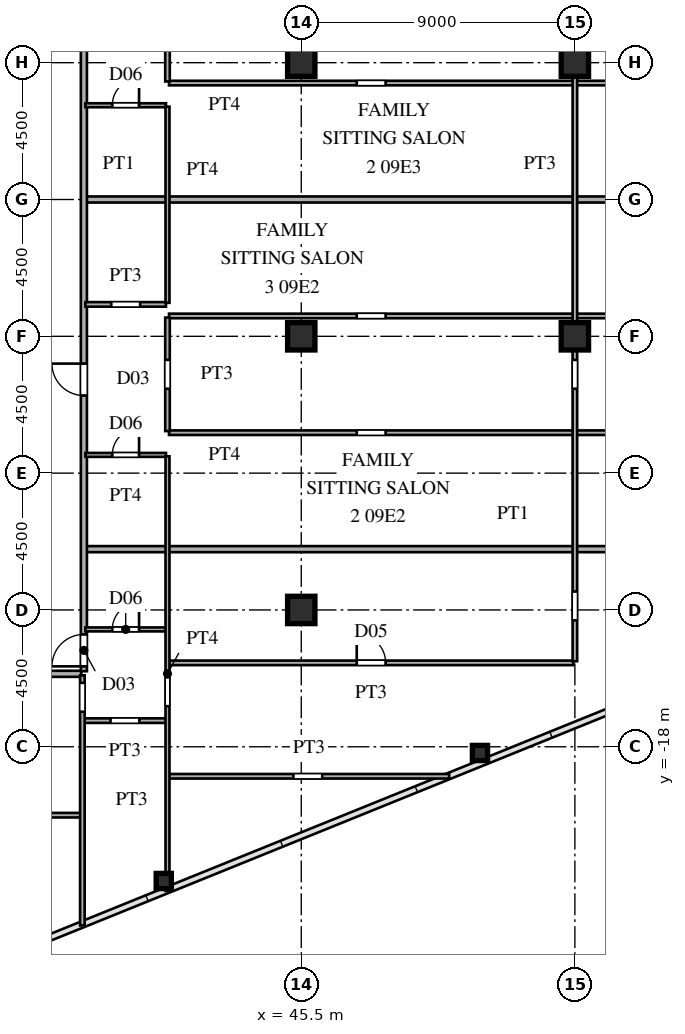
"""IFC4 building model, lengths in metres.
Left out: names, types, materials, properties, quantities, classifications, styles, units other than length and angle.
Written with IfcOpenShell. Run it as: python <this file> out.ifc"""

import sys

from ifc_helpers import new_model, si_unit, direction, frame, frame_2d, origin, origin_2d, place, context, subcontext, project, spatial, rectangle, hollow_rectangle, i_section, extrude, source, transform, mapped, element, fill, save


model = new_model("IFC4")
c1 = context("Model", 3, precision=1e-05, world=origin(), true_north=direction((0.0, 1.0)))
c2 = subcontext(c1, "Body", "Model", "MODEL_VIEW")
j1 = project(units=[si_unit("LENGTHUNIT", "METRE"), si_unit("PLANEANGLEUNIT", "RADIAN")], contexts=[c1])
p1 = place(None, origin())
s1 = spatial("IfcSite", under=j1, at=p1, CompositionType="ELEMENT")
p2 = place(p1, origin())
s2 = spatial("IfcBuilding", under=s1, at=p2, CompositionType="ELEMENT")
p3 = place(p2, frame((0.0, 0.0, 36.9)))
s3 = spatial("IfcBuildingStorey", under=s2, at=p3, CompositionType="ELEMENT", Elevation=36.9)
m1 = source(origin(), c2, "Body", "SweptSolid", [
    extrude(i_section(OverallWidth=0.9, OverallDepth=0.9, WebThickness=0.036, FlangeThickness=0.055, at=origin_2d()), origin(), (0.0, 0.0, 1.0), 3.6),
])
for number, where, z_axis, x_axis in (
    (1, (45.5, -13.5, 0.0), (0.0, 0.0, 1.0), (1.0, 0.0, 0.0)),
    (2, (45.5, -4.5, 0.0), (0.0, 0.0, 1.0), (1.0, 0.0, 0.0)),
    (3, (45.5, 4.5, 0.0), (0.0, 0.0, 1.0), (1.0, 0.0, 0.0)),
    (4, (54.5, -4.5, 0.0), (0.0, 0.0, 1.0), (1.0, 0.0, 0.0)),
    (5, (54.5, 4.5, 0.0), (0.0, 0.0, 1.0), (1.0, 0.0, 0.0)),
):
    element("IfcColumn", number, at=place(p3, frame(where, z_axis=z_axis, x_axis=x_axis)), inside=s3, PredefinedType="COLUMN", context=c2, shape_type="MappedRepresentation", body=[
        mapped(m1, transform((0.0, 0.0, 0.0), scale=1.0)),
    ])
m2 = source(origin(), c2, "Body", "SweptSolid", [
    extrude(hollow_rectangle(XDim=0.5, YDim=0.5, WallThickness=0.02, at=origin_2d()), origin(), (0.0, 0.0, 1.0), 3.6),
])
for number, where, z_axis, x_axis in (
    (6, (40.977, -22.414, 0.0), (0.0, 0.0, 1.0), (1.0, 0.0, 0.0)),
    (7, (51.378, -18.204, 0.0), (0.0, 0.0, 1.0), (1.0, 0.0, 0.0)),
):
    element("IfcColumn", number, at=place(p3, frame(where, z_axis=z_axis, x_axis=x_axis)), inside=s3, PredefinedType="COLUMN", context=c2, shape_type="MappedRepresentation", body=[
        mapped(m2, transform((0.0, 0.0, 0.0), scale=1.0)),
    ])
p4 = place(p3, frame((27.465, -20.25, 0.0), z_axis=(0.0, 0.0, 1.0), x_axis=(1.0, 0.0, 0.0)))
e8 = element("IfcWall", 8, at=p4, inside=s3, PredefinedType="PARTITIONING", context=c2, shape_type="SweptSolid", body=[
    extrude(rectangle(XDim=10.785, YDim=0.15, at=frame_2d((5.393, 0.0))), origin(), (0.0, 0.0, 1.0), 3.38),
])
p5 = place(p4, frame((4.96, 0.0, 0.0)))
e9 = element("IfcOpeningElement", 9, at=p5, cuts=e8, PredefinedType="OPENING", context=c2, shape_type="SweptSolid", body=[
    extrude(rectangle(XDim=0.95, YDim=2.15, at=frame_2d((0.475, 1.075))), frame((0.0, 0.085, 0.0), z_axis=(0.0, -1.0, 0.0), x_axis=(1.0, 0.0, 0.0)), (0.0, 0.0, 1.0), 0.17),
])
p6 = place(p3, frame((41.15, -18.97, 0.0), z_axis=(0.0, 0.0, 1.0), x_axis=(1.0, 0.0, 0.0)))
e10 = element("IfcWall", 10, at=p6, inside=s3, PredefinedType="PARTITIONING", context=c2, shape_type="SweptSolid", body=[
    extrude(rectangle(XDim=9.216, YDim=0.15, at=frame_2d((4.608, 0.0))), origin(), (0.0, 0.0, 1.0), 3.38),
])
p7 = place(p6, frame((4.091, 0.0, 0.0)))
e11 = element("IfcOpeningElement", 11, at=p7, cuts=e10, PredefinedType="OPENING", context=c2, shape_type="SweptSolid", body=[
    extrude(rectangle(XDim=0.95, YDim=2.15, at=frame_2d((0.475, 1.075))), frame((0.0, 0.085, 0.0), z_axis=(0.0, -1.0, 0.0), x_axis=(1.0, 0.0, 0.0)), (0.0, 0.0, 1.0), 0.17),
])
p8 = place(p3, frame((38.35, -17.14, 0.0), z_axis=(0.0, 0.0, 1.0), x_axis=(1.0, 0.0, 0.0)))
e12 = element("IfcWall", 12, at=p8, inside=s3, PredefinedType="PARTITIONING", context=c2, shape_type="SweptSolid", body=[
    extrude(rectangle(XDim=2.7, YDim=0.15, at=frame_2d((1.35, 0.0))), origin(), (0.0, 0.0, 1.0), 3.38),
])
p9 = place(p8, frame((0.875, 0.0, 0.0)))
e13 = element("IfcOpeningElement", 13, at=p9, cuts=e12, PredefinedType="OPENING", context=c2, shape_type="SweptSolid", body=[
    extrude(rectangle(XDim=0.95, YDim=2.15, at=frame_2d((0.475, 1.075))), frame((0.0, 0.085, 0.0), z_axis=(0.0, -1.0, 0.0), x_axis=(1.0, 0.0, 0.0)), (0.0, 0.0, 1.0), 0.17),
])
p10 = place(p3, frame((36.585, -15.6, 0.0), z_axis=(0.0, 0.0, 1.0), x_axis=(1.0, 0.0, 0.0)))
e14 = element("IfcWall", 14, at=p10, inside=s3, PredefinedType="PARTITIONING", context=c2, shape_type="SweptSolid", body=[
    extrude(rectangle(XDim=1.68, YDim=0.2, at=frame_2d((0.84, 0.0))), origin(), (0.0, 0.0, 1.0), 3.38),
])
p11 = place(p3, frame((41.15, -15.24, 0.0), z_axis=(0.0, 0.0, 1.0), x_axis=(1.0, 0.0, 0.0)))
e15 = element("IfcWall", 15, at=p11, inside=s3, PredefinedType="PARTITIONING", context=c2, shape_type="SweptSolid", body=[
    extrude(rectangle(XDim=13.3, YDim=0.15, at=frame_2d((6.65, 0.0))), origin(), (0.0, 0.0, 1.0), 3.38),
])
p12 = place(p11, frame((6.175, 0.0, 0.0)))
e16 = element("IfcOpeningElement", 16, at=p12, cuts=e15, PredefinedType="OPENING", context=c2, shape_type="SweptSolid", body=[
    extrude(rectangle(XDim=0.95, YDim=2.15, at=frame_2d((0.475, 1.075))), frame((0.0, 0.085, 0.0), z_axis=(0.0, -1.0, 0.0), x_axis=(1.0, 0.0, 0.0)), (0.0, 0.0, 1.0), 0.17),
])
p13 = place(p3, frame((38.4, -14.14, 0.0), z_axis=(0.0, 0.0, 1.0), x_axis=(1.0, 0.0, 0.0)))
e17 = element("IfcWall", 17, at=p13, inside=s3, PredefinedType="PARTITIONING", context=c2, shape_type="SweptSolid", body=[
    extrude(rectangle(XDim=2.65, YDim=0.13, at=frame_2d((1.325, 0.0))), origin(), (0.0, 0.0, 1.0), 3.38),
])
p14 = place(p13, frame((0.885, 0.0, 0.0)))
e18 = element("IfcOpeningElement", 18, at=p14, cuts=e17, PredefinedType="OPENING", context=c2, shape_type="SweptSolid", body=[
    extrude(rectangle(XDim=0.88, YDim=2.1, at=frame_2d((0.44, 1.05))), frame((0.0, 0.075, 0.0), z_axis=(0.0, -1.0, 0.0), x_axis=(1.0, 0.0, 0.0)), (0.0, 0.0, 1.0), 0.15),
])
p15 = place(p3, frame((38.43, -11.5, 0.0), z_axis=(0.0, 0.0, 1.0), x_axis=(1.0, 0.0, 0.0)))
e19 = element("IfcWall", 19, at=p15, inside=s3, PredefinedType="PARTITIONING", context=c2, shape_type="SweptSolid", body=[
    extrude(rectangle(XDim=30.377, YDim=0.2, at=frame_2d((15.188, 0.0))), origin(), (0.0, 0.0, 1.0), 3.38),
])
p16 = place(p3, frame((38.4, -8.4, 0.0), z_axis=(0.0, 0.0, 1.0), x_axis=(1.0, 0.0, 0.0)))
e20 = element("IfcWall", 20, at=p16, inside=s3, PredefinedType="PARTITIONING", context=c2, shape_type="SweptSolid", body=[
    extrude(rectangle(XDim=2.65, YDim=0.13, at=frame_2d((1.325, 0.0))), origin(), (0.0, 0.0, 1.0), 3.38),
])
p17 = place(p16, frame((0.885, 0.0, 0.0)))
e21 = element("IfcOpeningElement", 21, at=p17, cuts=e20, PredefinedType="OPENING", context=c2, shape_type="SweptSolid", body=[
    extrude(rectangle(XDim=0.88, YDim=2.1, at=frame_2d((0.44, 1.05))), frame((0.0, 0.075, 0.0), z_axis=(0.0, -1.0, 0.0), x_axis=(1.0, 0.0, 0.0)), (0.0, 0.0, 1.0), 0.15),
])
p18 = place(p3, frame((41.15, -7.67, 0.0), z_axis=(0.0, 0.0, 1.0), x_axis=(1.0, 0.0, 0.0)))
e22 = element("IfcWall", 22, at=p18, inside=s3, PredefinedType="PARTITIONING", context=c2, shape_type="SweptSolid", body=[
    extrude(rectangle(XDim=31.385, YDim=0.15, at=frame_2d((15.692, 0.0))), origin(), (0.0, 0.0, 1.0), 3.38),
])
p19 = place(p18, frame((6.175, 0.0, 0.0)))
e23 = element("IfcOpeningElement", 23, at=p19, cuts=e22, PredefinedType="OPENING", context=c2, shape_type="SweptSolid", body=[
    extrude(rectangle(XDim=0.95, YDim=2.15, at=frame_2d((0.475, 1.075))), frame((0.0, 0.085, 0.0), z_axis=(0.0, -1.0, 0.0), x_axis=(1.0, 0.0, 0.0)), (0.0, 0.0, 1.0), 0.17),
])
p20 = place(p18, frame((15.725, 0.0, 0.0)))
e24 = element("IfcOpeningElement", 24, at=p20, cuts=e22, PredefinedType="OPENING", context=c2, shape_type="SweptSolid", body=[
    extrude(rectangle(XDim=0.95, YDim=2.15, at=frame_2d((0.475, 1.075))), frame((0.0, 0.085, 0.0), z_axis=(0.0, -1.0, 0.0), x_axis=(1.0, 0.0, 0.0)), (0.0, 0.0, 1.0), 0.17),
])
p21 = place(p3, frame((41.15, -3.83, 0.0), z_axis=(0.0, 0.0, 1.0), x_axis=(1.0, 0.0, 0.0)))
e25 = element("IfcWall", 25, at=p21, inside=s3, PredefinedType="PARTITIONING", context=c2, shape_type="SweptSolid", body=[
    extrude(rectangle(XDim=31.385, YDim=0.15, at=frame_2d((15.692, 0.0))), origin(), (0.0, 0.0, 1.0), 3.38),
])
p22 = place(p21, frame((6.175, 0.0, 0.0)))
e26 = element("IfcOpeningElement", 26, at=p22, cuts=e25, PredefinedType="OPENING", context=c2, shape_type="SweptSolid", body=[
    extrude(rectangle(XDim=0.95, YDim=2.15, at=frame_2d((0.475, 1.075))), frame((0.0, 0.085, 0.0), z_axis=(0.0, -1.0, 0.0), x_axis=(1.0, 0.0, 0.0)), (0.0, 0.0, 1.0), 0.17),
])
p23 = place(p21, frame((15.725, 0.0, 0.0)))
e27 = element("IfcOpeningElement", 27, at=p23, cuts=e25, PredefinedType="OPENING", context=c2, shape_type="SweptSolid", body=[
    extrude(rectangle(XDim=0.95, YDim=2.15, at=frame_2d((0.475, 1.075))), frame((0.0, 0.085, 0.0), z_axis=(0.0, -1.0, 0.0), x_axis=(1.0, 0.0, 0.0)), (0.0, 0.0, 1.0), 0.17),
])
p24 = place(p3, frame((38.4, -3.45, 0.0), z_axis=(0.0, 0.0, 1.0), x_axis=(1.0, 0.0, 0.0)))
e28 = element("IfcWall", 28, at=p24, inside=s3, PredefinedType="PARTITIONING", context=c2, shape_type="SweptSolid", body=[
    extrude(rectangle(XDim=2.65, YDim=0.15, at=frame_2d((1.325, 0.0))), origin(), (0.0, 0.0, 1.0), 3.38),
])
p25 = place(p24, frame((0.85, 0.0, 0.0)))
e29 = element("IfcOpeningElement", 29, at=p25, cuts=e28, PredefinedType="OPENING", context=c2, shape_type="SweptSolid", body=[
    extrude(rectangle(XDim=0.95, YDim=2.15, at=frame_2d((0.475, 1.075))), frame((0.0, 0.085, 0.0), z_axis=(0.0, -1.0, 0.0), x_axis=(1.0, 0.0, 0.0)), (0.0, 0.0, 1.0), 0.17),
])
p26 = place(p3, frame((38.43, 0.0, 0.0), z_axis=(0.0, 0.0, 1.0), x_axis=(1.0, 0.0, 0.0)))
e30 = element("IfcWall", 30, at=p26, inside=s3, PredefinedType="PARTITIONING", context=c2, shape_type="SweptSolid", body=[
    extrude(rectangle(XDim=25.05, YDim=0.2, at=frame_2d((12.525, 0.0))), origin(), (0.0, 0.0, 1.0), 3.38),
])
p27 = place(p3, frame((38.4, 3.1, 0.0), z_axis=(0.0, 0.0, 1.0), x_axis=(1.0, 0.0, 0.0)))
e31 = element("IfcWall", 31, at=p27, inside=s3, PredefinedType="PARTITIONING", context=c2, shape_type="SweptSolid", body=[
    extrude(rectangle(XDim=2.65, YDim=0.13, at=frame_2d((1.325, 0.0))), origin(), (0.0, 0.0, 1.0), 3.38),
])
p28 = place(p27, frame((0.885, 0.0, 0.0)))
e32 = element("IfcOpeningElement", 32, at=p28, cuts=e31, PredefinedType="OPENING", context=c2, shape_type="SweptSolid", body=[
    extrude(rectangle(XDim=0.88, YDim=2.1, at=frame_2d((0.44, 1.05))), frame((0.0, 0.075, 0.0), z_axis=(0.0, -1.0, 0.0), x_axis=(1.0, 0.0, 0.0)), (0.0, 0.0, 1.0), 0.15),
])
p29 = place(p3, frame((41.15, 3.83, 0.0), z_axis=(0.0, 0.0, 1.0), x_axis=(1.0, 0.0, 0.0)))
e33 = element("IfcWall", 33, at=p29, inside=s3, PredefinedType="PARTITIONING", context=c2, shape_type="SweptSolid", body=[
    extrude(rectangle(XDim=31.385, YDim=0.15, at=frame_2d((15.692, 0.0))), origin(), (0.0, 0.0, 1.0), 3.38),
])
p30 = place(p29, frame((6.175, 0.0, 0.0)))
e34 = element("IfcOpeningElement", 34, at=p30, cuts=e33, PredefinedType="OPENING", context=c2, shape_type="SweptSolid", body=[
    extrude(rectangle(XDim=0.95, YDim=2.15, at=frame_2d((0.475, 1.075))), frame((0.0, 0.085, 0.0), z_axis=(0.0, -1.0, 0.0), x_axis=(1.0, 0.0, 0.0)), (0.0, 0.0, 1.0), 0.17),
])
p31 = place(p29, frame((15.725, 0.0, 0.0)))
e35 = element("IfcOpeningElement", 35, at=p31, cuts=e33, PredefinedType="OPENING", context=c2, shape_type="SweptSolid", body=[
    extrude(rectangle(XDim=0.95, YDim=2.15, at=frame_2d((0.475, 1.075))), frame((0.0, 0.085, 0.0), z_axis=(0.0, -1.0, 0.0), x_axis=(1.0, 0.0, 0.0)), (0.0, 0.0, 1.0), 0.17),
])
p32 = place(p3, frame((38.3, -23.878, 0.0), z_axis=(0.0, 0.0, 1.0), x_axis=(0.0, 1.0, 0.0)))
e36 = element("IfcWall", 36, at=p32, inside=s3, PredefinedType="PARTITIONING", context=c2, shape_type="SweptSolid", body=[
    extrude(rectangle(XDim=8.228, YDim=0.15, at=frame_2d((4.114, 0.0))), origin(), (0.0, 0.0, 1.0), 3.38),
])
p33 = place(p32, frame((7.031, 0.0, 0.0)))
e37 = element("IfcOpeningElement", 37, at=p33, cuts=e36, PredefinedType="OPENING", context=c2, shape_type="SweptSolid", body=[
    extrude(rectangle(XDim=0.95, YDim=2.15, at=frame_2d((0.475, 1.075))), frame((0.0, 0.085, 0.0), z_axis=(0.0, -1.0, 0.0), x_axis=(1.0, 0.0, 0.0)), (0.0, 0.0, 1.0), 0.17),
])
p34 = place(p3, frame((38.35, -15.515, 0.0), z_axis=(0.0, 0.0, 1.0), x_axis=(0.0, 1.0, 0.0)))
e38 = element("IfcWall", 38, at=p34, inside=s3, PredefinedType="PARTITIONING", context=c2, shape_type="SweptSolid", body=[
    extrude(rectangle(XDim=31.03, YDim=0.2, at=frame_2d((15.515, 0.0))), origin(), (0.0, 0.0, 1.0), 3.38),
])
p35 = place(p34, frame((0.16, 0.0, 0.0)))
e39 = element("IfcOpeningElement", 39, at=p35, cuts=e38, PredefinedType="OPENING", context=c2, shape_type="SweptSolid", body=[
    extrude(rectangle(XDim=1.05, YDim=2.25, at=frame_2d((0.525, 1.125))), frame((0.0, 0.11, 0.0), z_axis=(0.0, -1.0, 0.0), x_axis=(1.0, 0.0, 0.0)), (0.0, 0.0, 1.0), 0.22),
])
p36 = place(p34, frame((9.067, 0.0, 0.0)))
e40 = element("IfcOpeningElement", 40, at=p36, cuts=e38, PredefinedType="OPENING", context=c2, shape_type="SweptSolid", body=[
    extrude(rectangle(XDim=1.05, YDim=2.25, at=frame_2d((0.525, 1.125))), frame((0.0, 0.11, 0.0), z_axis=(0.0, -1.0, 0.0), x_axis=(1.0, 0.0, 0.0)), (0.0, 0.0, 1.0), 0.22),
])
p37 = place(p34, frame((20.567, 0.0, 0.0)))
e41 = element("IfcOpeningElement", 41, at=p37, cuts=e38, PredefinedType="OPENING", context=c2, shape_type="SweptSolid", body=[
    extrude(rectangle(XDim=1.05, YDim=2.25, at=frame_2d((0.525, 1.125))), frame((0.0, 0.11, 0.0), z_axis=(0.0, -1.0, 0.0), x_axis=(1.0, 0.0, 0.0)), (0.0, 0.0, 1.0), 0.22),
])
p38 = place(p34, frame((29.82, 0.0, 0.0)))
e42 = element("IfcOpeningElement", 42, at=p38, cuts=e38, PredefinedType="OPENING", context=c2, shape_type="SweptSolid", body=[
    extrude(rectangle(XDim=1.05, YDim=2.25, at=frame_2d((0.525, 1.125))), frame((0.0, 0.11, 0.0), z_axis=(0.0, -1.0, 0.0), x_axis=(1.0, 0.0, 0.0)), (0.0, 0.0, 1.0), 0.22),
])
p39 = place(p3, frame((41.1, -22.744, 0.0), z_axis=(0.0, 0.0, 1.0), x_axis=(0.0, 1.0, 0.0)))
e43 = element("IfcWall", 43, at=p39, inside=s3, PredefinedType="PARTITIONING", context=c2, shape_type="SweptSolid", body=[
    extrude(rectangle(XDim=14.297, YDim=0.13, at=frame_2d((7.148, 0.0))), origin(), (0.0, 0.0, 1.0), 3.38),
])
p40 = place(p39, frame((6.078, 0.0, 0.0)))
e44 = element("IfcOpeningElement", 44, at=p40, cuts=e43, PredefinedType="OPENING", context=c2, shape_type="SweptSolid", body=[
    extrude(rectangle(XDim=0.95, YDim=2.15, at=frame_2d((0.475, 1.075))), frame((0.0, 0.075, 0.0), z_axis=(0.0, -1.0, 0.0), x_axis=(1.0, 0.0, 0.0)), (0.0, 0.0, 1.0), 0.15),
])
p41 = place(p3, frame((41.1, -7.617, 0.0), z_axis=(0.0, 0.0, 1.0), x_axis=(0.0, 1.0, 0.0)))
e45 = element("IfcWall", 45, at=p41, inside=s3, PredefinedType="PARTITIONING", context=c2, shape_type="SweptSolid", body=[
    extrude(rectangle(XDim=3.734, YDim=0.15, at=frame_2d((1.867, 0.0))), origin(), (0.0, 0.0, 1.0), 2.99),
])
p42 = place(p41, frame((1.392, 0.0, 0.0)))
e46 = element("IfcOpeningElement", 46, at=p42, cuts=e45, PredefinedType="OPENING", context=c2, shape_type="SweptSolid", body=[
    extrude(rectangle(XDim=0.95, YDim=2.15, at=frame_2d((0.475, 1.075))), frame((0.0, 0.085, 0.0), z_axis=(0.0, -1.0, 0.0), x_axis=(1.0, 0.0, 0.0)), (0.0, 0.0, 1.0), 0.17),
])
p43 = place(p3, frame((41.1, -3.398, 0.0), z_axis=(0.0, 0.0, 1.0), x_axis=(0.0, 1.0, 0.0)))
e47 = element("IfcWall", 47, at=p43, inside=s3, PredefinedType="PARTITIONING", context=c2, shape_type="SweptSolid", body=[
    extrude(rectangle(XDim=6.451, YDim=0.13, at=frame_2d((3.226, 0.0))), origin(), (0.0, 0.0, 1.0), 3.38),
])
p44 = place(p3, frame((41.1, 3.883, 0.0), z_axis=(0.0, 0.0, 1.0), x_axis=(0.0, 1.0, 0.0)))
e48 = element("IfcWall", 48, at=p44, inside=s3, PredefinedType="PARTITIONING", context=c2, shape_type="SweptSolid", body=[
    extrude(rectangle(XDim=3.734, YDim=0.15, at=frame_2d((1.867, 0.0))), origin(), (0.0, 0.0, 1.0), 2.99),
])
p45 = place(p44, frame((1.392, 0.0, 0.0)))
e49 = element("IfcOpeningElement", 49, at=p45, cuts=e48, PredefinedType="OPENING", context=c2, shape_type="SweptSolid", body=[
    extrude(rectangle(XDim=0.95, YDim=2.15, at=frame_2d((0.475, 1.075))), frame((0.0, 0.085, 0.0), z_axis=(0.0, -1.0, 0.0), x_axis=(1.0, 0.0, 0.0)), (0.0, 0.0, 1.0), 0.17),
])
p46 = place(p3, frame((54.5, -15.186, 0.0), z_axis=(0.0, 0.0, 1.0), x_axis=(0.0, 1.0, 0.0)))
e50 = element("IfcWall", 50, at=p46, inside=s3, PredefinedType="PARTITIONING", context=c2, shape_type="SweptSolid", body=[
    extrude(rectangle(XDim=30.372, YDim=0.15, at=frame_2d((15.186, 0.0))), origin(), (0.0, 0.0, 1.0), 2.68),
])
p47 = place(p46, frame((1.343, 0.0, 0.0)))
e51 = element("IfcOpeningElement", 51, at=p47, cuts=e50, PredefinedType="OPENING", context=c2, shape_type="SweptSolid", body=[
    extrude(rectangle(XDim=0.95, YDim=2.15, at=frame_2d((0.475, 1.075))), frame((0.0, 0.085, 0.0), z_axis=(0.0, -1.0, 0.0), x_axis=(1.0, 0.0, 0.0)), (0.0, 0.0, 1.0), 0.17),
])
p48 = place(p46, frame((8.961, 0.0, 0.0)))
e52 = element("IfcOpeningElement", 52, at=p48, cuts=e50, PredefinedType="OPENING", context=c2, shape_type="SweptSolid", body=[
    extrude(rectangle(XDim=0.95, YDim=2.15, at=frame_2d((0.475, 1.075))), frame((0.0, 0.085, 0.0), z_axis=(0.0, -1.0, 0.0), x_axis=(1.0, 0.0, 0.0)), (0.0, 0.0, 1.0), 0.17),
])
p49 = place(p46, frame((20.461, 0.0, 0.0)))
e53 = element("IfcOpeningElement", 53, at=p49, cuts=e50, PredefinedType="OPENING", context=c2, shape_type="SweptSolid", body=[
    extrude(rectangle(XDim=0.95, YDim=2.15, at=frame_2d((0.475, 1.075))), frame((0.0, 0.085, 0.0), z_axis=(0.0, -1.0, 0.0), x_axis=(1.0, 0.0, 0.0)), (0.0, 0.0, 1.0), 0.17),
])
p50 = place(p46, frame((28.079, 0.0, 0.0)))
e54 = element("IfcOpeningElement", 54, at=p50, cuts=e50, PredefinedType="OPENING", context=c2, shape_type="SweptSolid", body=[
    extrude(rectangle(XDim=0.95, YDim=2.15, at=frame_2d((0.475, 1.075))), frame((0.0, 0.085, 0.0), z_axis=(0.0, -1.0, 0.0), x_axis=(1.0, 0.0, 0.0)), (0.0, 0.0, 1.0), 0.17),
])
m3 = source(origin(), c2, "Body", "SweptSolid", [
    extrude(rectangle(XDim=0.95, YDim=2.15, at=frame_2d((0.475, 1.075))), frame((0.0, 0.025, 0.0), z_axis=(0.0, -1.0, 0.0), x_axis=(1.0, 0.0, 0.0)), (0.0, 0.0, 1.0), 0.05),
])
p51 = place(p12, origin())
e55 = element("IfcDoor", 55, at=p51, inside=s3, OperationType="SINGLE_SWING_LEFT", PredefinedType="DOOR", context=c2, shape_type="MappedRepresentation", body=[
    mapped(m3, transform((0.0, 0.0, 0.0), scale=1.0)),
])
fill(e16, e55)
m4 = source(origin(), c2, "Body", "SweptSolid", [
    extrude(rectangle(XDim=0.88, YDim=2.1, at=frame_2d((0.44, 1.05))), frame((0.0, 0.025, 0.0), z_axis=(0.0, -1.0, 0.0), x_axis=(1.0, 0.0, 0.0)), (0.0, 0.0, 1.0), 0.05),
])
p52 = place(p14, origin())
e56 = element("IfcDoor", 56, at=p52, inside=s3, OperationType="SINGLE_SWING_RIGHT", PredefinedType="DOOR", context=c2, shape_type="MappedRepresentation", body=[
    mapped(m4, transform((0.0, 0.0, 0.0), scale=1.0)),
])
fill(e18, e56)
p53 = place(p17, origin())
e57 = element("IfcDoor", 57, at=p53, inside=s3, OperationType="SINGLE_SWING_RIGHT", PredefinedType="DOOR", context=c2, shape_type="MappedRepresentation", body=[
    mapped(m4, transform((0.0, 0.0, 0.0), scale=1.0)),
])
fill(e21, e57)
p54 = place(p28, origin())
e58 = element("IfcDoor", 58, at=p54, inside=s3, OperationType="SINGLE_SWING_RIGHT", PredefinedType="DOOR", context=c2, shape_type="MappedRepresentation", body=[
    mapped(m4, transform((0.0, 0.0, 0.0), scale=1.0)),
])
fill(e32, e58)
m5 = source(origin(), c2, "Body", "SweptSolid", [
    extrude(rectangle(XDim=1.05, YDim=2.25, at=frame_2d((0.525, 1.125))), frame((0.0, 0.025, 0.0), z_axis=(0.0, -1.0, 0.0), x_axis=(1.0, 0.0, 0.0)), (0.0, 0.0, 1.0), 0.05),
])
p55 = place(p35, origin())
e59 = element("IfcDoor", 59, at=p55, inside=s3, OperationType="SINGLE_SWING_LEFT", PredefinedType="DOOR", context=c2, shape_type="MappedRepresentation", body=[
    mapped(m5, transform((0.0, 0.0, 0.0), scale=1.0)),
])
fill(e39, e59)
p56 = place(p36, origin())
e60 = element("IfcDoor", 60, at=p56, inside=s3, OperationType="SINGLE_SWING_RIGHT", PredefinedType="DOOR", context=c2, shape_type="MappedRepresentation", body=[
    mapped(m5, transform((0.0, 0.0, 0.0), scale=1.0)),
])
fill(e40, e60)
save(model, sys.argv[1])
